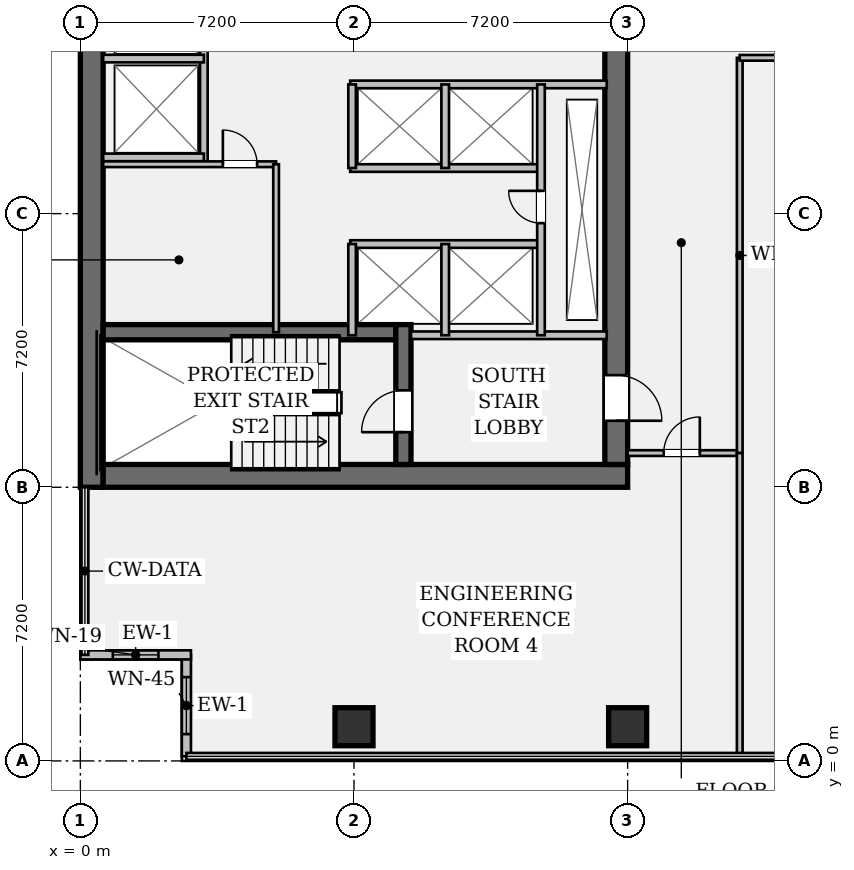
"""IFC4 building model, lengths in metres.
Left out: names, types, materials, properties, quantities, classifications, styles, units other than length and angle.
Written with IfcOpenShell. Run it as: python <this file> out.ifc"""

import sys

from ifc_helpers import new_model, si_unit, direction, frame, frame_2d, origin, origin_2d, place, context, subcontext, project, spatial, rectangle, hollow_rectangle, extrude, element, fill, save


model = new_model("IFC4")
c1 = context("Model", 3, precision=1e-05, world=origin(), true_north=direction((0.0, 1.0)))
c2 = subcontext(c1, "Body", "Model", "MODEL_VIEW")
j1 = project(units=[si_unit("LENGTHUNIT", "METRE"), si_unit("PLANEANGLEUNIT", "RADIAN")], contexts=[c1])
p1 = place(None, origin())
s1 = spatial("IfcSite", under=j1, at=p1, CompositionType="ELEMENT")
p2 = place(p1, origin())
s2 = spatial("IfcBuilding", under=s1, at=p2, CompositionType="ELEMENT")
p3 = place(p2, frame((0.0, 0.0, 50.4)))
s3 = spatial("IfcBuildingStorey", under=s2, at=p3, CompositionType="ELEMENT", Elevation=50.4)
p4 = place(p3, frame((0.3, 7.2, 0.0), z_axis=(0.0, 0.0, 1.0), x_axis=(0.0, 1.0, 0.0)))
e1 = element("IfcWall", 1, at=p4, inside=s3, PredefinedType="SHEAR", context=c2, shape_type="SweptSolid", body=[
    extrude(rectangle(XDim=28.8, YDim=0.6, at=frame_2d((14.4, 0.0))), origin(), (0.0, 0.0, 1.0), 3.57),
])
p5 = place(p3, frame((0.6, 7.5, 0.0), z_axis=(0.0, 0.0, 1.0), x_axis=(1.0, 0.0, 0.0)))
e2 = element("IfcWall", 2, at=p5, inside=s3, PredefinedType="SHEAR", context=c2, shape_type="SweptSolid", body=[
    extrude(rectangle(XDim=13.8, YDim=0.6, at=frame_2d((6.9, 0.0))), origin(), (0.0, 0.0, 1.0), 3.57),
])
p6 = place(p3, frame((14.1, 35.4, 0.0), z_axis=(0.0, 0.0, 1.0), x_axis=(0.0, -1.0, 0.0)))
e3 = element("IfcWall", 3, at=p6, inside=s3, PredefinedType="SHEAR", context=c2, shape_type="SweptSolid", body=[
    extrude(rectangle(XDim=27.6, YDim=0.6, at=frame_2d((13.8, 0.0))), origin(), (0.0, 0.0, 1.0), 3.57),
])
p7 = place(p6, frame((1.3, 0.0, 0.0)))
e4 = element("IfcOpeningElement", 4, at=p7, cuts=e3, PredefinedType="OPENING", context=c2, shape_type="SweptSolid", body=[
    extrude(rectangle(XDim=1.2, YDim=2.15, at=frame_2d((0.6, 1.075))), frame((0.0, 0.312, 0.0), z_axis=(0.0, -1.0, 0.0), x_axis=(1.0, 0.0, 0.0)), (0.0, 0.0, 1.0), 0.624),
])
p8 = place(p6, frame((25.25, 0.0, 0.0)))
e5 = element("IfcOpeningElement", 5, at=p8, cuts=e3, PredefinedType="OPENING", context=c2, shape_type="SweptSolid", body=[
    extrude(rectangle(XDim=1.2, YDim=2.15, at=frame_2d((0.6, 1.075))), frame((0.0, 0.312, 0.0), z_axis=(0.0, -1.0, 0.0), x_axis=(1.0, 0.0, 0.0)), (0.0, 0.0, 1.0), 0.624),
])
p9 = place(p6, frame((14.6, 0.0, 0.0)))
e6 = element("IfcOpeningElement", 6, at=p9, cuts=e3, PredefinedType="OPENING", context=c2, shape_type="SweptSolid", body=[
    extrude(rectangle(XDim=1.6, YDim=2.2, at=frame_2d((0.8, 1.1))), frame((0.0, 0.312, 0.0), z_axis=(0.0, -1.0, 0.0), x_axis=(1.0, 0.0, 0.0)), (0.0, 0.0, 1.0), 0.624),
])
p10 = place(p3, frame((0.6, 11.28, 0.0), z_axis=(0.0, 0.0, 1.0), x_axis=(1.0, 0.0, 0.0)))
e7 = element("IfcWall", 7, at=p10, inside=s3, PredefinedType="SHEAR", context=c2, shape_type="SweptSolid", body=[
    extrude(rectangle(XDim=7.7, YDim=0.4, at=frame_2d((3.85, 0.0))), origin(), (0.0, 0.0, 1.0), 3.57),
])
p11 = place(p3, frame((8.5, 7.8, 0.0), z_axis=(0.0, 0.0, 1.0), x_axis=(0.0, 1.0, 0.0)))
e8 = element("IfcWall", 8, at=p11, inside=s3, PredefinedType="SHEAR", context=c2, shape_type="SweptSolid", body=[
    extrude(rectangle(XDim=3.68, YDim=0.4, at=frame_2d((1.84, 0.0))), origin(), (0.0, 0.0, 1.0), 3.57),
])
p12 = place(p11, frame((0.85, 0.0, 0.0)))
e9 = element("IfcOpeningElement", 9, at=p12, cuts=e8, PredefinedType="OPENING", context=c2, shape_type="SweptSolid", body=[
    extrude(rectangle(XDim=1.1, YDim=2.15, at=frame_2d((0.55, 1.075))), frame((0.0, 0.212, 0.0), z_axis=(0.0, -1.0, 0.0), x_axis=(1.0, 0.0, 0.0)), (0.0, 0.0, 1.0), 0.424),
])
for number, where, z_axis, x_axis in (
    (10, (7.2, 0.9, 0.0), (0.0, 0.0, 1.0), (1.0, 0.0, 0.0)),
    (11, (14.4, 0.9, 0.0), (0.0, 0.0, 1.0), (1.0, 0.0, 0.0)),
):
    element("IfcColumn", number, at=place(p3, frame(where, z_axis=z_axis, x_axis=x_axis)), inside=s3, PredefinedType="COLUMN", context=c2, shape_type="SweptSolid", body=[
        extrude(hollow_rectangle(XDim=1.0, YDim=1.0, WallThickness=0.065, at=origin_2d()), origin(), (0.0, 0.0, 1.0), 3.57),
    ])
p13 = place(p3, frame((2.79, 0.12, 0.0), z_axis=(0.0, 0.0, 1.0), x_axis=(0.0, 1.0, 0.0)))
e12 = element("IfcWall", 12, at=p13, inside=s3, PredefinedType="STANDARD", context=c2, shape_type="SweptSolid", body=[
    extrude(rectangle(XDim=2.67, YDim=0.24, at=frame_2d((1.335, 0.0))), origin(), (0.0, 0.0, 1.0), 3.57),
])
p14 = place(p13, frame((0.585, 0.0, 0.95)))
e13 = element("IfcOpeningElement", 13, at=p14, cuts=e12, PredefinedType="OPENING", context=c2, shape_type="SweptSolid", body=[
    extrude(rectangle(XDim=1.5, YDim=1.8, at=frame_2d((0.75, 0.9))), frame((0.0, 0.132, 0.0), z_axis=(0.0, -1.0, 0.0), x_axis=(1.0, 0.0, 0.0)), (0.0, 0.0, 1.0), 0.264),
])
p15 = place(p3, frame((2.91, 2.79, 0.0), z_axis=(0.0, 0.0, 1.0), x_axis=(-1.0, 0.0, 0.0)))
e14 = element("IfcWall", 14, at=p15, inside=s3, PredefinedType="STANDARD", context=c2, shape_type="SweptSolid", body=[
    extrude(rectangle(XDim=2.91, YDim=0.24, at=frame_2d((1.455, 0.0))), origin(), (0.0, 0.0, 1.0), 3.57),
])
p16 = place(p15, frame((0.855, 0.0, 0.95)))
e15 = element("IfcOpeningElement", 15, at=p16, cuts=e14, PredefinedType="OPENING", context=c2, shape_type="SweptSolid", body=[
    extrude(rectangle(XDim=1.2, YDim=1.8, at=frame_2d((0.6, 0.9))), frame((0.0, 0.132, 0.0), z_axis=(0.0, -1.0, 0.0), x_axis=(1.0, 0.0, 0.0)), (0.0, 0.0, 1.0), 0.264),
])
p17 = place(p3, frame((8.7, 11.2, 0.0), z_axis=(0.0, 0.0, 1.0), x_axis=(1.0, 0.0, 0.0)))
e16 = element("IfcWall", 16, at=p17, inside=s3, PredefinedType="PARTITIONING", context=c2, shape_type="SweptSolid", body=[
    extrude(rectangle(XDim=5.15, YDim=0.2, at=frame_2d((2.575, 0.0))), origin(), (0.0, 0.0, 1.0), 3.57),
])
p18 = place(p3, frame((3.25, 15.7, 0.0), z_axis=(0.0, 0.0, 1.0), x_axis=(0.0, 1.0, 0.0)))
e17 = element("IfcWall", 17, at=p18, inside=s3, PredefinedType="PARTITIONING", context=c2, shape_type="SweptSolid", body=[
    extrude(rectangle(XDim=13.08, YDim=0.2, at=frame_2d((6.54, 0.0))), origin(), (0.0, 0.0, 1.0), 3.57),
])
for number, where, z_axis, x_axis in (
    (18, (0.6, 15.88, 0.0), (0.0, 0.0, 1.0), (1.0, 0.0, 0.0)),
    (19, (0.6, 18.48, 0.0), (0.0, 0.0, 1.0), (1.0, 0.0, 0.0)),
):
    element("IfcWall", number, at=place(p3, frame(where, z_axis=z_axis, x_axis=x_axis)), inside=s3, PredefinedType="PARTITIONING", context=c2, shape_type="SweptSolid", body=[
        extrude(rectangle(XDim=2.65, YDim=0.2, at=frame_2d((1.325, 0.0))), origin(), (0.0, 0.0, 1.0), 3.57),
    ])
p19 = place(p3, frame((7.1, 17.8, 0.0), z_axis=(0.0, 0.0, 1.0), x_axis=(1.0, 0.0, 0.0)))
e20 = element("IfcWall", 20, at=p19, inside=s3, PredefinedType="PARTITIONING", context=c2, shape_type="SweptSolid", body=[
    extrude(rectangle(XDim=6.75, YDim=0.2, at=frame_2d((3.375, 0.0))), origin(), (0.0, 0.0, 1.0), 3.57),
])
for number, where, z_axis, x_axis in (
    (21, (7.1, 15.6, 0.0), (0.0, 0.0, 1.0), (1.0, 0.0, 0.0)),
    (22, (7.1, 13.6, 0.0), (0.0, 0.0, 1.0), (1.0, 0.0, 0.0)),
):
    element("IfcWall", number, at=place(p3, frame(where, z_axis=z_axis, x_axis=x_axis)), inside=s3, PredefinedType="PARTITIONING", context=c2, shape_type="SweptSolid", body=[
        extrude(rectangle(XDim=5.02, YDim=0.2, at=frame_2d((2.51, 0.0))), origin(), (0.0, 0.0, 1.0), 3.57),
    ])
p20 = place(p3, frame((7.15, 15.6, 0.0), z_axis=(0.0, 0.0, 1.0), x_axis=(0.0, 1.0, 0.0)))
e23 = element("IfcWall", 23, at=p20, inside=s3, PredefinedType="PARTITIONING", context=c2, shape_type="SweptSolid", body=[
    extrude(rectangle(XDim=2.2, YDim=0.2, at=frame_2d((1.1, 0.0))), origin(), (0.0, 0.0, 1.0), 3.57),
])
p21 = place(p3, frame((7.15, 11.2, 0.0), z_axis=(0.0, 0.0, 1.0), x_axis=(0.0, 1.0, 0.0)))
e24 = element("IfcWall", 24, at=p21, inside=s3, PredefinedType="PARTITIONING", context=c2, shape_type="SweptSolid", body=[
    extrude(rectangle(XDim=2.4, YDim=0.2, at=frame_2d((1.2, 0.0))), origin(), (0.0, 0.0, 1.0), 3.57),
])
p22 = place(p3, frame((9.6, 15.6, 0.0), z_axis=(0.0, 0.0, 1.0), x_axis=(0.0, 1.0, 0.0)))
e25 = element("IfcWall", 25, at=p22, inside=s3, PredefinedType="PARTITIONING", context=c2, shape_type="SweptSolid", body=[
    extrude(rectangle(XDim=2.2, YDim=0.2, at=frame_2d((1.1, 0.0))), origin(), (0.0, 0.0, 1.0), 3.57),
])
p23 = place(p3, frame((9.6, 11.2, 0.0), z_axis=(0.0, 0.0, 1.0), x_axis=(0.0, 1.0, 0.0)))
e26 = element("IfcWall", 26, at=p23, inside=s3, PredefinedType="PARTITIONING", context=c2, shape_type="SweptSolid", body=[
    extrude(rectangle(XDim=2.4, YDim=0.2, at=frame_2d((1.2, 0.0))), origin(), (0.0, 0.0, 1.0), 3.57),
])
p24 = place(p3, frame((12.12, 11.2, 0.0), z_axis=(0.0, 0.0, 1.0), x_axis=(0.0, 1.0, 0.0)))
e27 = element("IfcWall", 27, at=p24, inside=s3, PredefinedType="PARTITIONING", context=c2, shape_type="SweptSolid", body=[
    extrude(rectangle(XDim=6.6, YDim=0.2, at=frame_2d((3.3, 0.0))), origin(), (0.0, 0.0, 1.0), 3.57),
])
p25 = place(p24, frame((2.95, 0.0, 0.0)))
e28 = element("IfcOpeningElement", 28, at=p25, cuts=e27, PredefinedType="OPENING", context=c2, shape_type="SweptSolid", body=[
    extrude(rectangle(XDim=0.85, YDim=2.15, at=frame_2d((0.425, 1.075))), frame((0.0, 0.112, 0.0), z_axis=(0.0, -1.0, 0.0), x_axis=(1.0, 0.0, 0.0)), (0.0, 0.0, 1.0), 0.224),
])
p26 = place(p3, frame((0.6, 15.7, 0.0), z_axis=(0.0, 0.0, 1.0), x_axis=(1.0, 0.0, 0.0)))
e29 = element("IfcWall", 29, at=p26, inside=s3, PredefinedType="PARTITIONING", context=c2, shape_type="SweptSolid", body=[
    extrude(rectangle(XDim=4.55, YDim=0.15, at=frame_2d((2.275, 0.0))), origin(), (0.0, 0.0, 1.0), 3.57),
])
p27 = place(p26, frame((3.15, 0.0, 0.0)))
e30 = element("IfcOpeningElement", 30, at=p27, cuts=e29, PredefinedType="OPENING", context=c2, shape_type="SweptSolid", body=[
    extrude(rectangle(XDim=0.9, YDim=2.15, at=frame_2d((0.45, 1.075))), frame((0.0, 0.087, 0.0), z_axis=(0.0, -1.0, 0.0), x_axis=(1.0, 0.0, 0.0)), (0.0, 0.0, 1.0), 0.174),
])
p28 = place(p3, frame((5.15, 11.28, 0.0), z_axis=(0.0, 0.0, 1.0), x_axis=(0.0, 1.0, 0.0)))
e31 = element("IfcWall", 31, at=p28, inside=s3, PredefinedType="PARTITIONING", context=c2, shape_type="SweptSolid", body=[
    extrude(rectangle(XDim=4.42, YDim=0.15, at=frame_2d((2.21, 0.0))), origin(), (0.0, 0.0, 1.0), 3.57),
])
p29 = place(p3, frame((14.4, 8.1, 0.0), z_axis=(0.0, 0.0, 1.0), x_axis=(1.0, 0.0, 0.0)))
e32 = element("IfcWall", 32, at=p29, inside=s3, PredefinedType="PARTITIONING", context=c2, shape_type="SweptSolid", body=[
    extrude(rectangle(XDim=2.95, YDim=0.15, at=frame_2d((1.475, 0.0))), origin(), (0.0, 0.0, 1.0), 3.088),
])
p30 = place(p29, frame((0.95, 0.0, 0.0)))
e33 = element("IfcOpeningElement", 33, at=p30, cuts=e32, PredefinedType="OPENING", context=c2, shape_type="SweptSolid", body=[
    extrude(rectangle(XDim=0.95, YDim=2.15, at=frame_2d((0.475, 1.075))), frame((0.0, 0.087, 0.0), z_axis=(0.0, -1.0, 0.0), x_axis=(1.0, 0.0, 0.0)), (0.0, 0.0, 1.0), 0.174),
])
p31 = place(p3, frame((17.35, 8.1, 0.0), z_axis=(0.0, 0.0, 1.0), x_axis=(0.0, 1.0, 0.0)))
e34 = element("IfcWall", 34, at=p31, inside=s3, PredefinedType="PARTITIONING", context=c2, shape_type="SweptSolid", body=[
    extrude(rectangle(XDim=10.4, YDim=0.15, at=frame_2d((5.2, 0.0))), origin(), (0.0, 0.0, 1.0), 2.699),
])
p32 = place(p3, frame((17.35, 18.5, 0.0), z_axis=(0.0, 0.0, 1.0), x_axis=(1.0, 0.0, 0.0)))
e35 = element("IfcWall", 35, at=p32, inside=s3, PredefinedType="PARTITIONING", context=c2, shape_type="SweptSolid", body=[
    extrude(rectangle(XDim=27.05, YDim=0.15, at=frame_2d((13.525, 0.0))), origin(), (0.0, 0.0, 1.0), 2.699),
])
p33 = place(p32, frame((2.52, 0.0, 0.0)))
e36 = element("IfcOpeningElement", 36, at=p33, cuts=e35, PredefinedType="OPENING", context=c2, shape_type="SweptSolid", body=[
    extrude(rectangle(XDim=0.95, YDim=2.15, at=frame_2d((0.475, 1.075))), frame((0.0, 0.087, 0.0), z_axis=(0.0, -1.0, 0.0), x_axis=(1.0, 0.0, 0.0)), (0.0, 0.0, 1.0), 0.174),
])
p34 = place(p32, frame((9.15, 0.0, 0.0)))
e37 = element("IfcOpeningElement", 37, at=p34, cuts=e35, PredefinedType="OPENING", context=c2, shape_type="SweptSolid", body=[
    extrude(rectangle(XDim=0.95, YDim=2.15, at=frame_2d((0.475, 1.075))), frame((0.0, 0.087, 0.0), z_axis=(0.0, -1.0, 0.0), x_axis=(1.0, 0.0, 0.0)), (0.0, 0.0, 1.0), 0.174),
])
p35 = place(p32, frame((16.35, 0.0, 0.0)))
e38 = element("IfcOpeningElement", 38, at=p35, cuts=e35, PredefinedType="OPENING", context=c2, shape_type="SweptSolid", body=[
    extrude(rectangle(XDim=0.95, YDim=2.15, at=frame_2d((0.475, 1.075))), frame((0.0, 0.087, 0.0), z_axis=(0.0, -1.0, 0.0), x_axis=(1.0, 0.0, 0.0)), (0.0, 0.0, 1.0), 0.174),
])
p36 = place(p32, frame((23.25, 0.0, 0.0)))
e39 = element("IfcOpeningElement", 39, at=p36, cuts=e35, PredefinedType="OPENING", context=c2, shape_type="SweptSolid", body=[
    extrude(rectangle(XDim=0.95, YDim=2.15, at=frame_2d((0.475, 1.075))), frame((0.0, 0.087, 0.0), z_axis=(0.0, -1.0, 0.0), x_axis=(1.0, 0.0, 0.0)), (0.0, 0.0, 1.0), 0.174),
])
p37 = place(p3, frame((17.35, 0.12, 0.0), z_axis=(0.0, 0.0, 1.0), x_axis=(0.0, 1.0, 0.0)))
e40 = element("IfcWall", 40, at=p37, inside=s3, PredefinedType="PARTITIONING", context=c2, shape_type="SweptSolid", body=[
    extrude(rectangle(XDim=7.98, YDim=0.15, at=frame_2d((3.99, 0.0))), origin(), (0.0, 0.0, 1.0), 2.699),
])
p38 = place(p14, origin())
e41 = element("IfcWindow", 41, at=p38, inside=s3, PartitioningType="SINGLE_PANEL", PredefinedType="WINDOW", context=c2, shape_type="SweptSolid", body=[
    extrude(rectangle(XDim=1.5, YDim=1.8, at=frame_2d((0.75, 0.9))), frame((0.0, 0.03, 0.0), z_axis=(0.0, -1.0, 0.0), x_axis=(1.0, 0.0, 0.0)), (0.0, 0.0, 1.0), 0.06),
])
fill(e13, e41)
p39 = place(p16, origin())
e42 = element("IfcWindow", 42, at=p39, inside=s3, PartitioningType="SINGLE_PANEL", PredefinedType="WINDOW", context=c2, shape_type="SweptSolid", body=[
    extrude(rectangle(XDim=1.2, YDim=1.8, at=frame_2d((0.6, 0.9))), frame((0.0, 0.03, 0.0), z_axis=(0.0, -1.0, 0.0), x_axis=(1.0, 0.0, 0.0)), (0.0, 0.0, 1.0), 0.06),
])
fill(e15, e42)
p40 = place(p12, origin())
e43 = element("IfcDoor", 43, at=p40, inside=s3, OperationType="SINGLE_SWING_LEFT", PredefinedType="DOOR", context=c2, shape_type="SweptSolid", body=[
    extrude(rectangle(XDim=1.1, YDim=2.15, at=frame_2d((0.55, 1.075))), frame((0.0, 0.025, 0.0), z_axis=(0.0, -1.0, 0.0), x_axis=(1.0, 0.0, 0.0)), (0.0, 0.0, 1.0), 0.05),
])
fill(e9, e43)
p41 = place(p8, origin())
e44 = element("IfcDoor", 44, at=p41, inside=s3, OperationType="SINGLE_SWING_RIGHT", PredefinedType="DOOR", context=c2, shape_type="SweptSolid", body=[
    extrude(rectangle(XDim=1.2, YDim=2.15, at=frame_2d((0.6, 1.075))), frame((0.0, 0.025, 0.0), z_axis=(0.0, -1.0, 0.0), x_axis=(1.0, 0.0, 0.0)), (0.0, 0.0, 1.0), 0.05),
])
fill(e5, e44)
p42 = place(p25, origin())
e45 = element("IfcDoor", 45, at=p42, inside=s3, OperationType="SINGLE_SWING_RIGHT", PredefinedType="DOOR", context=c2, shape_type="SweptSolid", body=[
    extrude(rectangle(XDim=0.85, YDim=2.15, at=frame_2d((0.425, 1.075))), frame((0.0, 0.025, 0.0), z_axis=(0.0, -1.0, 0.0), x_axis=(1.0, 0.0, 0.0)), (0.0, 0.0, 1.0), 0.05),
])
fill(e28, e45)
p43 = place(p27, origin())
e46 = element("IfcDoor", 46, at=p43, inside=s3, OperationType="SINGLE_SWING_LEFT", PredefinedType="DOOR", context=c2, shape_type="SweptSolid", body=[
    extrude(rectangle(XDim=0.9, YDim=2.15, at=frame_2d((0.45, 1.075))), frame((0.0, 0.025, 0.0), z_axis=(0.0, -1.0, 0.0), x_axis=(1.0, 0.0, 0.0)), (0.0, 0.0, 1.0), 0.05),
])
fill(e30, e46)
p44 = place(p30, origin())
e47 = element("IfcDoor", 47, at=p44, inside=s3, OperationType="SINGLE_SWING_RIGHT", PredefinedType="DOOR", context=c2, shape_type="SweptSolid", body=[
    extrude(rectangle(XDim=0.95, YDim=2.15, at=frame_2d((0.475, 1.075))), frame((0.0, 0.025, 0.0), z_axis=(0.0, -1.0, 0.0), x_axis=(1.0, 0.0, 0.0)), (0.0, 0.0, 1.0), 0.05),
])
fill(e33, e47)
save(model, sys.argv[1])
